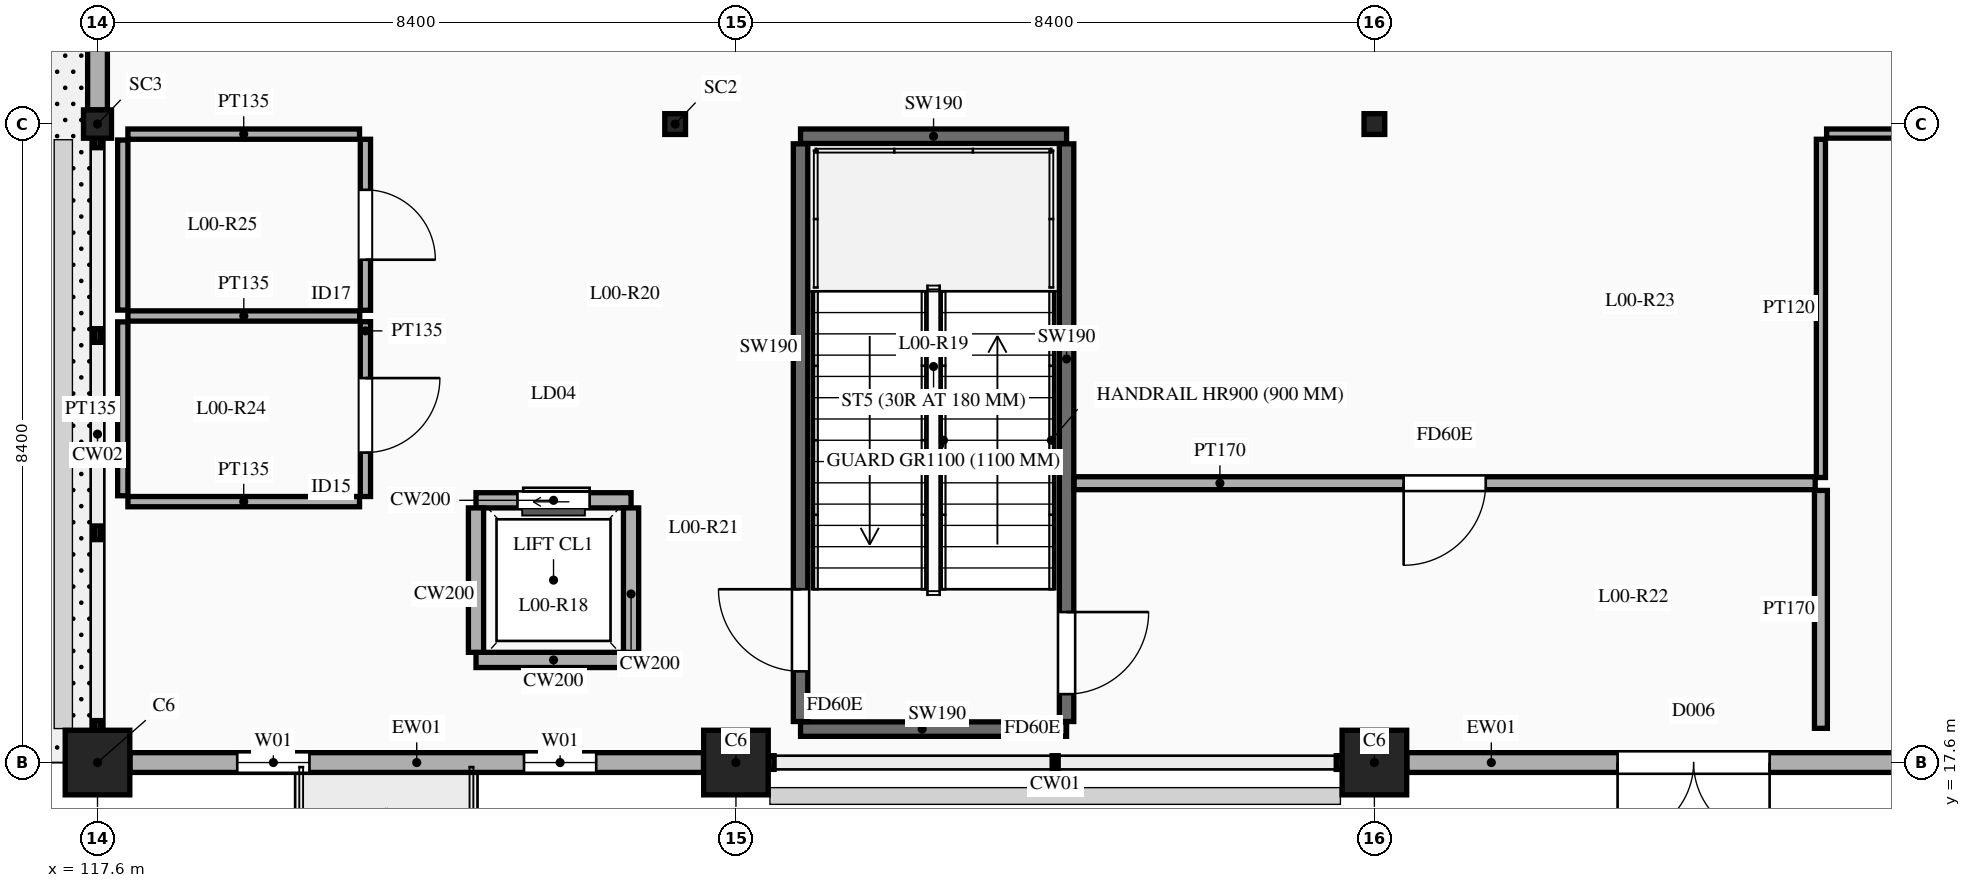
"""IFC4 building model, lengths in metres.
Left out: names, types, materials, properties, quantities, classifications, styles, units other than length and angle.
Written with IfcOpenShell. Run it as: python <this file> out.ifc"""

import sys

from ifc_helpers import new_model, si_unit, direction, frame, frame_2d, origin, origin_2d, place, context, subcontext, project, spatial, rectangle, hollow_circle, i_section, extrude, element, fill, save


model = new_model("IFC4")
c1 = context("Model", 3, precision=1e-05, world=origin(), true_north=direction((0.0, 1.0)))
c2 = subcontext(c1, "Body", "Model", "MODEL_VIEW")
j1 = project(units=[si_unit("LENGTHUNIT", "METRE"), si_unit("PLANEANGLEUNIT", "RADIAN")], contexts=[c1])
p1 = place(None, origin())
s1 = spatial("IfcSite", under=j1, at=p1, CompositionType="ELEMENT")
p2 = place(p1, origin())
s2 = spatial("IfcBuilding", under=s1, at=p2, CompositionType="ELEMENT")
p3 = place(p2, origin())
s3 = spatial("IfcBuildingStorey", under=s2, at=p3, CompositionType="ELEMENT", Elevation=0.0)
p4 = place(p3, frame((117.6, 17.6, 0.0), z_axis=(0.0, 0.0, 1.0), x_axis=(1.0, 0.0, 0.0)))
e1 = element("IfcColumn", 1, at=p4, inside=s3, PredefinedType="COLUMN", context=c2, shape_type="SweptSolid", body=[
    extrude(rectangle(XDim=0.85, YDim=0.85, at=origin_2d()), origin(), (0.0, 0.0, 1.0), 5.4),
])
p5 = place(p3, frame((117.6, 26.0, 0.0), z_axis=(0.0, 0.0, 1.0), x_axis=(1.0, 0.0, 0.0)))
e2 = element("IfcColumn", 2, at=p5, inside=s3, PredefinedType="COLUMN", context=c2, shape_type="SweptSolid", body=[
    extrude(i_section(OverallWidth=0.373, OverallDepth=0.368, WebThickness=0.014, FlangeThickness=0.024, FilletRadius=0.015, at=origin_2d()), origin(), (0.0, 0.0, 1.0), 5.4),
])
for number, where, z_axis, x_axis in (
    (3, (126.0, 17.6, 0.0), (0.0, 0.0, 1.0), (1.0, 0.0, 0.0)),
    (4, (134.4, 17.6, 0.0), (0.0, 0.0, 1.0), (1.0, 0.0, 0.0)),
):
    element("IfcColumn", number, at=place(p3, frame(where, z_axis=z_axis, x_axis=x_axis)), inside=s3, PredefinedType="COLUMN", context=c2, shape_type="SweptSolid", body=[
        extrude(rectangle(XDim=0.85, YDim=0.85, at=origin_2d()), origin(), (0.0, 0.0, 1.0), 5.4),
    ])
for number, where, z_axis, x_axis in (
    (5, (125.2, 26.0, 0.0), (0.0, 0.0, 1.0), (1.0, 0.0, 0.0)),
    (6, (134.4, 26.0, 0.0), (0.0, 0.0, 1.0), (1.0, 0.0, 0.0)),
):
    element("IfcColumn", number, at=place(p3, frame(where, z_axis=z_axis, x_axis=x_axis)), inside=s3, PredefinedType="COLUMN", context=c2, shape_type="SweptSolid", body=[
        extrude(hollow_circle(Radius=0.136, WallThickness=0.01, at=origin_2d()), origin(), (0.0, 0.0, 1.0), 5.2),
    ])
p6 = place(p3, frame((118.027, 17.6, 0.0), z_axis=(0.0, 0.0, 1.0), x_axis=(1.0, 0.0, 0.0)))
e7 = element("IfcWall", 7, at=p6, inside=s3, PredefinedType="SOLIDWALL", context=c2, shape_type="SweptSolid", body=[
    extrude(rectangle(XDim=7.546, YDim=0.26, at=frame_2d((3.773, 0.0))), origin(), (0.0, 0.0, 1.0), 4.45),
])
p7 = place(p6, frame((1.412, 0.0, 0.9)))
e8 = element("IfcOpeningElement", 8, at=p7, cuts=e7, PredefinedType="OPENING", context=c2, shape_type="SweptSolid", body=[
    extrude(rectangle(XDim=0.95, YDim=1.8, at=frame_2d((0.475, 0.9))), frame((0.0, 0.14, 0.0), z_axis=(0.0, -1.0, 0.0), x_axis=(1.0, 0.0, 0.0)), (0.0, 0.0, 1.0), 0.28),
])
p8 = place(p6, frame((5.185, 0.0, 0.9)))
e9 = element("IfcOpeningElement", 9, at=p8, cuts=e7, PredefinedType="OPENING", context=c2, shape_type="SweptSolid", body=[
    extrude(rectangle(XDim=0.95, YDim=1.8, at=frame_2d((0.475, 0.9))), frame((0.0, 0.14, 0.0), z_axis=(0.0, -1.0, 0.0), x_axis=(1.0, 0.0, 0.0)), (0.0, 0.0, 1.0), 0.28),
])
p9 = place(p3, frame((134.827, 17.6, 0.0), z_axis=(0.0, 0.0, 1.0), x_axis=(1.0, 0.0, 0.0)))
e10 = element("IfcWall", 10, at=p9, inside=s3, PredefinedType="SOLIDWALL", context=c2, shape_type="SweptSolid", body=[
    extrude(rectangle(XDim=7.546, YDim=0.26, at=frame_2d((3.773, 0.0))), origin(), (0.0, 0.0, 1.0), 4.45),
])
p10 = place(p9, frame((2.773, 0.0, 0.0)))
e11 = element("IfcOpeningElement", 11, at=p10, cuts=e10, PredefinedType="OPENING", context=c2, shape_type="SweptSolid", body=[
    extrude(rectangle(XDim=2.0, YDim=2.4, at=frame_2d((1.0, 1.2))), frame((0.0, 0.14, 0.0), z_axis=(0.0, -1.0, 0.0), x_axis=(1.0, 0.0, 0.0)), (0.0, 0.0, 1.0), 0.28),
])
p11 = place(p3, frame((117.6, 26.186, 0.0), z_axis=(0.0, 0.0, 1.0), x_axis=(0.0, 1.0, 0.0)))
e12 = element("IfcWall", 12, at=p11, inside=s3, PredefinedType="SOLIDWALL", context=c2, shape_type="SweptSolid", body=[
    extrude(rectangle(XDim=8.028, YDim=0.26, at=frame_2d((4.014, 0.0))), origin(), (0.0, 0.0, 1.0), 4.45),
])
p12 = place(p11, frame((3.064, 0.0, 0.0)))
e13 = element("IfcOpeningElement", 13, at=p12, cuts=e12, PredefinedType="OPENING", context=c2, shape_type="SweptSolid", body=[
    extrude(rectangle(XDim=1.9, YDim=2.4, at=frame_2d((0.95, 1.2))), frame((0.0, 0.14, 0.0), z_axis=(0.0, -1.0, 0.0), x_axis=(1.0, 0.0, 0.0)), (0.0, 0.0, 1.0), 0.28),
])
p13 = place(p3, frame((122.58, 21.05, 0.0), z_axis=(0.0, 0.0, 1.0), x_axis=(1.0, 0.0, 0.0)))
e14 = element("IfcWall", 14, at=p13, inside=s3, PredefinedType="SOLIDWALL", context=c2, shape_type="SweptSolid", body=[
    extrude(rectangle(XDim=2.04, YDim=0.2, at=frame_2d((1.02, 0.0))), origin(), (0.0, 0.0, 1.0), 5.2),
])
p14 = place(p13, frame((0.545, 0.0, 0.0)))
e15 = element("IfcOpeningElement", 15, at=p14, cuts=e14, PredefinedType="OPENING", context=c2, shape_type="SweptSolid", body=[
    extrude(rectangle(XDim=0.95, YDim=2.15, at=frame_2d((0.475, 1.075))), frame((0.0, 0.11, 0.0), z_axis=(0.0, -1.0, 0.0), x_axis=(1.0, 0.0, 0.0)), (0.0, 0.0, 1.0), 0.22),
])
p15 = place(p3, frame((122.58, 18.95, 0.0), z_axis=(0.0, 0.0, 1.0), x_axis=(1.0, 0.0, 0.0)))
e16 = element("IfcWall", 16, at=p15, inside=s3, PredefinedType="SOLIDWALL", context=c2, shape_type="SweptSolid", body=[
    extrude(rectangle(XDim=2.04, YDim=0.2, at=frame_2d((1.02, 0.0))), origin(), (0.0, 0.0, 1.0), 5.2),
])
for number, where, z_axis, x_axis in (
    (17, (122.58, 19.05, 0.0), (0.0, 0.0, 1.0), (0.0, 1.0, 0.0)),
    (18, (124.62, 19.05, 0.0), (0.0, 0.0, 1.0), (0.0, 1.0, 0.0)),
):
    element("IfcWall", number, at=place(p3, frame(where, z_axis=z_axis, x_axis=x_axis)), inside=s3, PredefinedType="SOLIDWALL", context=c2, shape_type="SweptSolid", body=[
        extrude(rectangle(XDim=1.9, YDim=0.2, at=frame_2d((0.95, 0.0))), origin(), (0.0, 0.0, 1.0), 5.2),
    ])
for number, where, z_axis, x_axis in (
    (19, (126.85, 18.04, 0.0), (0.0, 0.0, 1.0), (1.0, 0.0, 0.0)),
    (20, (126.85, 25.84, 0.0), (0.0, 0.0, 1.0), (1.0, 0.0, 0.0)),
):
    element("IfcWall", number, at=place(p3, frame(where, z_axis=z_axis, x_axis=x_axis)), inside=s3, PredefinedType="SOLIDWALL", context=c2, shape_type="SweptSolid", body=[
        extrude(rectangle(XDim=3.5, YDim=0.19, at=frame_2d((1.75, 0.0))), origin(), (0.0, 0.0, 1.0), 5.2),
    ])
p16 = place(p3, frame((126.85, 18.14, 0.0), z_axis=(0.0, 0.0, 1.0), x_axis=(0.0, 1.0, 0.0)))
e21 = element("IfcWall", 21, at=p16, inside=s3, PredefinedType="SOLIDWALL", context=c2, shape_type="SweptSolid", body=[
    extrude(rectangle(XDim=7.6, YDim=0.19, at=frame_2d((3.8, 0.0))), origin(), (0.0, 0.0, 1.0), 5.2),
])
p17 = place(p16, frame((0.66, 0.0, 0.0)))
e22 = element("IfcOpeningElement", 22, at=p17, cuts=e21, PredefinedType="OPENING", context=c2, shape_type="SweptSolid", body=[
    extrude(rectangle(XDim=1.08, YDim=2.15, at=frame_2d((0.54, 1.075))), frame((0.0, 0.105, 0.0), z_axis=(0.0, -1.0, 0.0), x_axis=(1.0, 0.0, 0.0)), (0.0, 0.0, 1.0), 0.21),
])
p18 = place(p3, frame((130.35, 18.14, 0.0), z_axis=(0.0, 0.0, 1.0), x_axis=(0.0, 1.0, 0.0)))
e23 = element("IfcWall", 23, at=p18, inside=s3, PredefinedType="SOLIDWALL", context=c2, shape_type="SweptSolid", body=[
    extrude(rectangle(XDim=7.6, YDim=0.19, at=frame_2d((3.8, 0.0))), origin(), (0.0, 0.0, 1.0), 5.2),
])
p19 = place(p18, frame((0.36, 0.0, 0.0)))
e24 = element("IfcOpeningElement", 24, at=p19, cuts=e23, PredefinedType="OPENING", context=c2, shape_type="SweptSolid", body=[
    extrude(rectangle(XDim=1.08, YDim=2.15, at=frame_2d((0.54, 1.075))), frame((0.0, 0.105, 0.0), z_axis=(0.0, -1.0, 0.0), x_axis=(1.0, 0.0, 0.0)), (0.0, 0.0, 1.0), 0.21),
])
p20 = place(p3, frame((121.125, 21.1, 0.0), z_axis=(0.0, 0.0, 1.0), x_axis=(0.0, 1.0, 0.0)))
e25 = element("IfcWall", 25, at=p20, inside=s3, PredefinedType="PARTITIONING", context=c2, shape_type="SweptSolid", body=[
    extrude(rectangle(XDim=2.3, YDim=0.135, at=frame_2d((1.15, 0.0))), origin(), (0.0, 0.0, 1.0), 4.35),
])
p21 = place(p20, frame((0.578, 0.0, 0.0)))
e26 = element("IfcOpeningElement", 26, at=p21, cuts=e25, PredefinedType="OPENING", context=c2, shape_type="SweptSolid", body=[
    extrude(rectangle(XDim=0.98, YDim=2.15, at=frame_2d((0.49, 1.075))), frame((0.0, 0.077, 0.0), z_axis=(0.0, -1.0, 0.0), x_axis=(1.0, 0.0, 0.0)), (0.0, 0.0, 1.0), 0.155),
])
p22 = place(p3, frame((121.125, 23.55, 0.0), z_axis=(0.0, 0.0, 1.0), x_axis=(0.0, 1.0, 0.0)))
e27 = element("IfcWall", 27, at=p22, inside=s3, PredefinedType="PARTITIONING", context=c2, shape_type="SweptSolid", body=[
    extrude(rectangle(XDim=2.25, YDim=0.135, at=frame_2d((1.125, 0.0))), origin(), (0.0, 0.0, 1.0), 4.35),
])
p23 = place(p22, frame((0.665, 0.0, 0.0)))
e28 = element("IfcOpeningElement", 28, at=p23, cuts=e27, PredefinedType="OPENING", context=c2, shape_type="SweptSolid", body=[
    extrude(rectangle(XDim=0.92, YDim=2.12, at=frame_2d((0.46, 1.06))), frame((0.0, 0.077, 0.0), z_axis=(0.0, -1.0, 0.0), x_axis=(1.0, 0.0, 0.0)), (0.0, 0.0, 1.0), 0.155),
])
p24 = place(p3, frame((130.45, 21.275, 0.0), z_axis=(0.0, 0.0, 1.0), x_axis=(1.0, 0.0, 0.0)))
e29 = element("IfcWall", 29, at=p24, inside=s3, PredefinedType="PARTITIONING", context=c2, shape_type="SweptSolid", body=[
    extrude(rectangle(XDim=9.75, YDim=0.17, at=frame_2d((4.875, 0.0))), origin(), (0.0, 0.0, 1.0), 4.35),
])
p25 = place(p24, frame((4.335, 0.0, 0.0)))
e30 = element("IfcOpeningElement", 30, at=p25, cuts=e29, PredefinedType="OPENING", context=c2, shape_type="SweptSolid", body=[
    extrude(rectangle(XDim=1.08, YDim=2.15, at=frame_2d((0.54, 1.075))), frame((0.0, 0.095, 0.0), z_axis=(0.0, -1.0, 0.0), x_axis=(1.0, 0.0, 0.0)), (0.0, 0.0, 1.0), 0.19),
])
p26 = place(p3, frame((140.275, 18.05, 0.0), z_axis=(0.0, 0.0, 1.0), x_axis=(0.0, 1.0, 0.0)))
e31 = element("IfcWall", 31, at=p26, inside=s3, PredefinedType="PARTITIONING", context=c2, shape_type="SweptSolid", body=[
    extrude(rectangle(XDim=3.13, YDim=0.17, at=frame_2d((1.565, 0.0))), origin(), (0.0, 0.0, 1.0), 4.35),
])
p27 = place(p3, frame((140.275, 21.35, 0.0), z_axis=(0.0, 0.0, 1.0), x_axis=(0.0, 1.0, 0.0)))
e32 = element("IfcWall", 32, at=p27, inside=s3, PredefinedType="PARTITIONING", context=c2, shape_type="SweptSolid", body=[
    extrude(rectangle(XDim=4.45, YDim=0.12, at=frame_2d((2.225, 0.0))), origin(), (0.0, 0.0, 1.0), 4.35),
])
p28 = place(p3, frame((118.0, 23.475, 0.0), z_axis=(0.0, 0.0, 1.0), x_axis=(1.0, 0.0, 0.0)))
e33 = element("IfcWall", 33, at=p28, inside=s3, PredefinedType="PARTITIONING", context=c2, shape_type="SweptSolid", body=[
    extrude(rectangle(XDim=3.05, YDim=0.135, at=frame_2d((1.525, 0.0))), origin(), (0.0, 0.0, 1.0), 4.35),
])
p29 = place(p3, frame((140.35, 25.875, 0.0), z_axis=(0.0, 0.0, 1.0), x_axis=(1.0, 0.0, 0.0)))
e34 = element("IfcWall", 34, at=p29, inside=s3, PredefinedType="PARTITIONING", context=c2, shape_type="SweptSolid", body=[
    extrude(rectangle(XDim=2.283, YDim=0.12, at=frame_2d((1.142, 0.0))), origin(), (0.0, 0.0, 1.0), 4.35),
])
p30 = place(p3, frame((118.0, 21.032, 0.0), z_axis=(0.0, 0.0, 1.0), x_axis=(1.0, 0.0, 0.0)))
e35 = element("IfcWall", 35, at=p30, inside=s3, PredefinedType="PARTITIONING", context=c2, shape_type="SweptSolid", body=[
    extrude(rectangle(XDim=3.048, YDim=0.135, at=frame_2d((1.524, 0.0))), origin(), (0.0, 0.0, 1.0), 4.35),
])
p31 = place(p3, frame((117.933, 21.11, 0.0), z_axis=(0.0, 0.0, 1.0), x_axis=(0.0, 1.0, 0.0)))
e36 = element("IfcWall", 36, at=p31, inside=s3, PredefinedType="PARTITIONING", context=c2, shape_type="SweptSolid", body=[
    extrude(rectangle(XDim=2.287, YDim=0.135, at=frame_2d((1.144, 0.0))), origin(), (0.0, 0.0, 1.0), 4.35),
])
p32 = place(p3, frame((118.0, 25.867, 0.0), z_axis=(0.0, 0.0, 1.0), x_axis=(1.0, 0.0, 0.0)))
e37 = element("IfcWall", 37, at=p32, inside=s3, PredefinedType="PARTITIONING", context=c2, shape_type="SweptSolid", body=[
    extrude(rectangle(XDim=3.048, YDim=0.135, at=frame_2d((1.524, 0.0))), origin(), (0.0, 0.0, 1.0), 4.35),
])
p33 = place(p3, frame((117.933, 23.552, 0.0), z_axis=(0.0, 0.0, 1.0), x_axis=(0.0, 1.0, 0.0)))
e38 = element("IfcWall", 38, at=p33, inside=s3, PredefinedType="PARTITIONING", context=c2, shape_type="SweptSolid", body=[
    extrude(rectangle(XDim=2.238, YDim=0.135, at=frame_2d((1.119, 0.0))), origin(), (0.0, 0.0, 1.0), 4.35),
])
p34 = place(p7, origin())
e39 = element("IfcWindow", 39, at=p34, inside=s3, PartitioningType="SINGLE_PANEL", PredefinedType="WINDOW", context=c2, shape_type="SweptSolid", body=[
    extrude(rectangle(XDim=0.95, YDim=1.8, at=frame_2d((0.475, 0.9))), frame((0.0, 0.03, 0.0), z_axis=(0.0, -1.0, 0.0), x_axis=(1.0, 0.0, 0.0)), (0.0, 0.0, 1.0), 0.06),
])
fill(e8, e39)
p35 = place(p8, origin())
e40 = element("IfcWindow", 40, at=p35, inside=s3, PartitioningType="SINGLE_PANEL", PredefinedType="WINDOW", context=c2, shape_type="SweptSolid", body=[
    extrude(rectangle(XDim=0.95, YDim=1.8, at=frame_2d((0.475, 0.9))), frame((0.0, 0.03, 0.0), z_axis=(0.0, -1.0, 0.0), x_axis=(1.0, 0.0, 0.0)), (0.0, 0.0, 1.0), 0.06),
])
fill(e9, e40)
p36 = place(p10, frame((2.0, 0.0, 0.0), z_axis=(0.0, 0.0, 1.0), x_axis=(-1.0, 0.0, 0.0)))
e41 = element("IfcDoor", 41, at=p36, inside=s3, OperationType="DOUBLE_DOOR_SINGLE_SWING", PredefinedType="DOOR", context=c2, shape_type="SweptSolid", body=[
    extrude(rectangle(XDim=2.0, YDim=2.4, at=frame_2d((1.0, 1.2))), frame((0.0, 0.025, 0.0), z_axis=(0.0, -1.0, 0.0), x_axis=(1.0, 0.0, 0.0)), (0.0, 0.0, 1.0), 0.05),
])
fill(e11, e41)
p37 = place(p14, origin())
e42 = element("IfcDoor", 42, at=p37, inside=s3, OperationType="SLIDING_TO_LEFT", PredefinedType="DOOR", context=c2, shape_type="SweptSolid", body=[
    extrude(rectangle(XDim=0.95, YDim=2.15, at=frame_2d((0.475, 1.075))), frame((0.0, 0.025, 0.0), z_axis=(0.0, -1.0, 0.0), x_axis=(1.0, 0.0, 0.0)), (0.0, 0.0, 1.0), 0.05),
])
fill(e15, e42)
p38 = place(p19, frame((1.08, 0.0, 0.0), z_axis=(0.0, 0.0, 1.0), x_axis=(-1.0, 0.0, 0.0)))
e43 = element("IfcDoor", 43, at=p38, inside=s3, OperationType="SINGLE_SWING_LEFT", PredefinedType="DOOR", context=c2, shape_type="SweptSolid", body=[
    extrude(rectangle(XDim=1.08, YDim=2.15, at=frame_2d((0.54, 1.075))), frame((0.0, 0.025, 0.0), z_axis=(0.0, -1.0, 0.0), x_axis=(1.0, 0.0, 0.0)), (0.0, 0.0, 1.0), 0.05),
])
fill(e24, e43)
p39 = place(p17, origin())
e44 = element("IfcDoor", 44, at=p39, inside=s3, OperationType="SINGLE_SWING_RIGHT", PredefinedType="DOOR", context=c2, shape_type="SweptSolid", body=[
    extrude(rectangle(XDim=1.08, YDim=2.15, at=frame_2d((0.54, 1.075))), frame((0.0, 0.025, 0.0), z_axis=(0.0, -1.0, 0.0), x_axis=(1.0, 0.0, 0.0)), (0.0, 0.0, 1.0), 0.05),
])
fill(e22, e44)
p40 = place(p21, frame((0.98, 0.0, 0.0), z_axis=(0.0, 0.0, 1.0), x_axis=(-1.0, 0.0, 0.0)))
e45 = element("IfcDoor", 45, at=p40, inside=s3, OperationType="SINGLE_SWING_LEFT", PredefinedType="DOOR", context=c2, shape_type="SweptSolid", body=[
    extrude(rectangle(XDim=0.98, YDim=2.15, at=frame_2d((0.49, 1.075))), frame((0.0, 0.025, 0.0), z_axis=(0.0, -1.0, 0.0), x_axis=(1.0, 0.0, 0.0)), (0.0, 0.0, 1.0), 0.05),
])
fill(e26, e45)
p41 = place(p23, frame((0.92, 0.0, 0.0), z_axis=(0.0, 0.0, 1.0), x_axis=(-1.0, 0.0, 0.0)))
e46 = element("IfcDoor", 46, at=p41, inside=s3, OperationType="SINGLE_SWING_RIGHT", PredefinedType="DOOR", context=c2, shape_type="SweptSolid", body=[
    extrude(rectangle(XDim=0.92, YDim=2.12, at=frame_2d((0.46, 1.06))), frame((0.0, 0.025, 0.0), z_axis=(0.0, -1.0, 0.0), x_axis=(1.0, 0.0, 0.0)), (0.0, 0.0, 1.0), 0.05),
])
fill(e28, e46)
p42 = place(p25, frame((1.08, 0.0, 0.0), z_axis=(0.0, 0.0, 1.0), x_axis=(-1.0, 0.0, 0.0)))
e47 = element("IfcDoor", 47, at=p42, inside=s3, OperationType="SINGLE_SWING_RIGHT", PredefinedType="DOOR", context=c2, shape_type="SweptSolid", body=[
    extrude(rectangle(XDim=1.08, YDim=2.15, at=frame_2d((0.54, 1.075))), frame((0.0, 0.025, 0.0), z_axis=(0.0, -1.0, 0.0), x_axis=(1.0, 0.0, 0.0)), (0.0, 0.0, 1.0), 0.05),
])
fill(e30, e47)
save(model, sys.argv[1])
